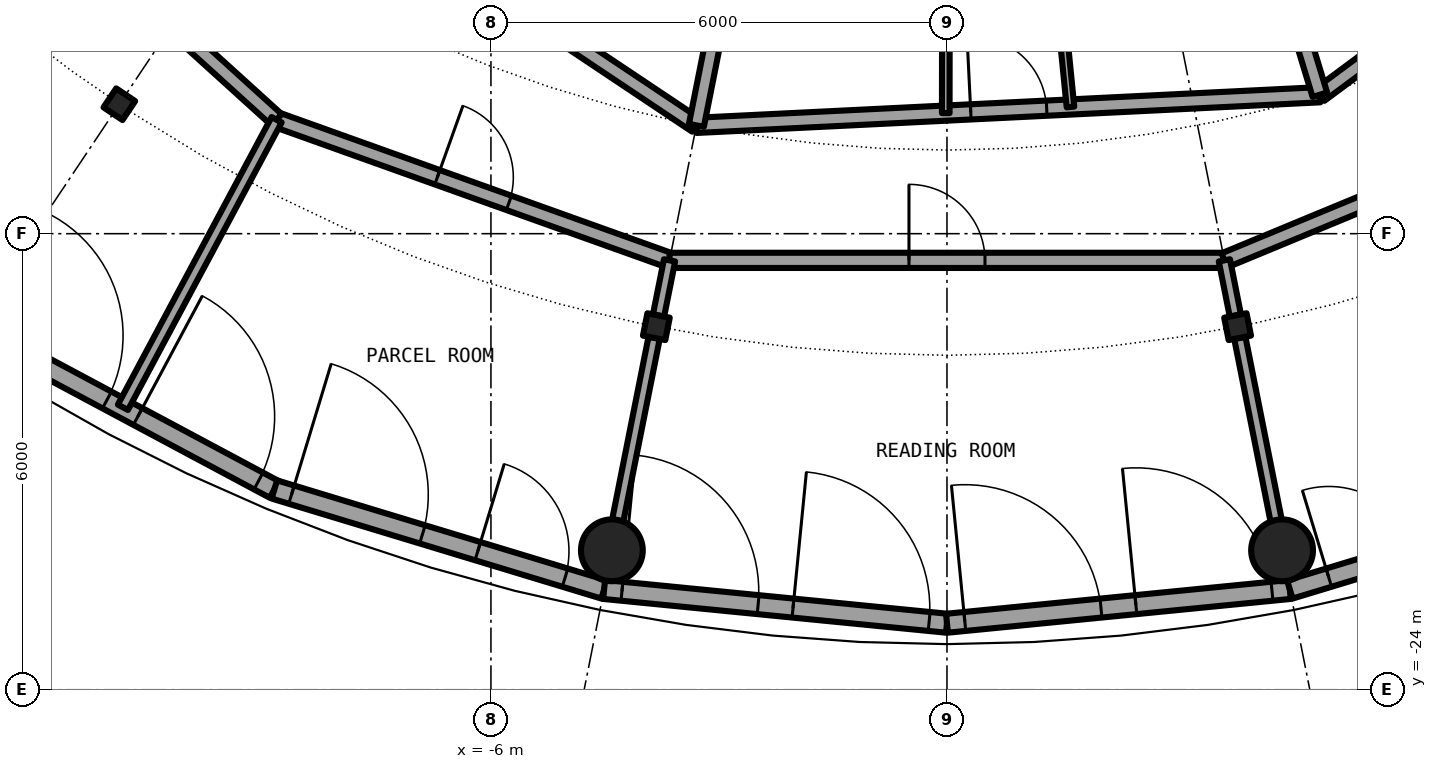
"""IFC4 building model, lengths in metres.
Left out: names, types, materials, properties, quantities, classifications, styles, units other than length and angle.
Written with IfcOpenShell. Run it as: python <this file> out.ifc"""

import sys

from ifc_helpers import new_model, si_unit, direction, frame, frame_2d, origin, origin_2d, place, context, subcontext, project, spatial, rectangle, hollow_circle, i_section, extrude, element, fill, save


model = new_model("IFC4")
c1 = context("Model", 3, precision=1e-05, world=origin(), true_north=direction((0.0, 1.0)))
c2 = subcontext(c1, "Body", "Model", "MODEL_VIEW")
j1 = project(units=[si_unit("LENGTHUNIT", "METRE"), si_unit("PLANEANGLEUNIT", "RADIAN")], contexts=[c1])
p1 = place(None, origin())
s1 = spatial("IfcSite", under=j1, at=p1, CompositionType="ELEMENT")
p2 = place(p1, origin())
s2 = spatial("IfcBuilding", under=s1, at=p2, CompositionType="ELEMENT")
p3 = place(p2, frame((0.0, 0.0, 249.3)))
s3 = spatial("IfcBuildingStorey", under=s2, at=p3, CompositionType="ELEMENT", Elevation=249.3)
for number, where, z_axis, x_axis in (
    (1, (-4.409, -22.166, 0.0), (0.0, 0.0, 1.0), (1.0, 0.0, 0.0)),
    (2, (4.409, -22.166, 0.0), (0.0, 0.0, 1.0), (1.0, 0.0, 0.0)),
):
    element("IfcColumn", number, at=place(p3, frame(where, z_axis=z_axis, x_axis=x_axis)), inside=s3, PredefinedType="COLUMN", context=c2, shape_type="SweptSolid", body=[
        extrude(hollow_circle(Radius=0.406, WallThickness=0.03, at=origin_2d()), origin(), (0.0, 0.0, 1.0), 3.05),
    ])
for number, where, z_axis, x_axis in (
    (3, (-10.889, -16.297, 0.0), (0.0, 0.0, 1.0), (-0.556, -0.831, 0.0)),
    (4, (-3.824, -19.223, 0.0), (0.0, 0.0, 1.0), (-0.195, -0.981, 0.0)),
    (5, (3.824, -19.223, 0.0), (0.0, 0.0, 1.0), (0.195, -0.981, 0.0)),
):
    element("IfcColumn", number, at=place(p3, frame(where, z_axis=z_axis, x_axis=x_axis)), inside=s3, PredefinedType="COLUMN", context=c2, shape_type="SweptSolid", body=[
        extrude(i_section(OverallWidth=0.3, OverallDepth=0.3, WebThickness=0.011, FlangeThickness=0.019, FilletRadius=0.027, at=origin_2d()), origin(), (0.0, 0.0, 1.0), 3.05),
    ])
p4 = place(p3, frame((-12.848, -19.228, 0.0), z_axis=(0.0, 0.0, 1.0), x_axis=(0.881912752543, -0.471412660947, 0.0)))
e6 = element("IfcWall", 6, at=p4, inside=s3, PredefinedType="SOLIDWALL", context=c2, shape_type="SweptSolid", body=[
    extrude(rectangle(XDim=4.533, YDim=0.25, at=frame_2d((2.267, 0.0))), origin(), (0.0, 0.0, 1.0), 2.7),
])
p5 = place(p4, frame((0.236, 0.0, 0.0)))
e7 = element("IfcOpeningElement", 7, at=p5, cuts=e6, PredefinedType="OPENING", context=c2, shape_type="SweptSolid", body=[
    extrude(rectangle(XDim=1.8, YDim=2.2, at=frame_2d((0.9, 1.1))), frame((0.0, 0.135, 0.0), z_axis=(0.0, -1.0, 0.0), x_axis=(1.0, 0.0, 0.0)), (0.0, 0.0, 1.0), 0.27),
])
p6 = place(p4, frame((2.497, 0.0, 0.0)))
e8 = element("IfcOpeningElement", 8, at=p6, cuts=e6, PredefinedType="OPENING", context=c2, shape_type="SweptSolid", body=[
    extrude(rectangle(XDim=1.8, YDim=2.2, at=frame_2d((0.9, 1.1))), frame((0.0, 0.135, 0.0), z_axis=(0.0, -1.0, 0.0), x_axis=(1.0, 0.0, 0.0)), (0.0, 0.0, 1.0), 0.27),
])
p7 = place(p3, frame((-8.85, -21.365, 0.0), z_axis=(0.0, 0.0, 1.0), x_axis=(0.956960982965, -0.290216603735, 0.0)))
e9 = element("IfcWall", 9, at=p7, inside=s3, PredefinedType="SOLIDWALL", context=c2, shape_type="SweptSolid", body=[
    extrude(rectangle(XDim=4.534, YDim=0.25, at=frame_2d((2.267, 0.0))), origin(), (0.0, 0.0, 1.0), 2.7),
])
p8 = place(p7, frame((0.236, 0.0, 0.0)))
e10 = element("IfcOpeningElement", 10, at=p8, cuts=e9, PredefinedType="OPENING", context=c2, shape_type="SweptSolid", body=[
    extrude(rectangle(XDim=1.8, YDim=2.2, at=frame_2d((0.9, 1.1))), frame((0.0, 0.135, 0.0), z_axis=(0.0, -1.0, 0.0), x_axis=(1.0, 0.0, 0.0)), (0.0, 0.0, 1.0), 0.27),
])
p9 = place(p7, frame((2.797, 0.0, 0.0)))
e11 = element("IfcOpeningElement", 11, at=p9, cuts=e9, PredefinedType="OPENING", context=c2, shape_type="SweptSolid", body=[
    extrude(rectangle(XDim=1.2, YDim=2.2, at=frame_2d((0.6, 1.1))), frame((0.0, 0.135, 0.0), z_axis=(0.0, -1.0, 0.0), x_axis=(1.0, 0.0, 0.0)), (0.0, 0.0, 1.0), 0.27),
])
p10 = place(p3, frame((-4.511, -22.681, 0.0), z_axis=(0.0, 0.0, 1.0), x_axis=(0.995189063612, -0.097973096645, 0.0)))
e12 = element("IfcWall", 12, at=p10, inside=s3, PredefinedType="SOLIDWALL", context=c2, shape_type="SweptSolid", body=[
    extrude(rectangle(XDim=4.533, YDim=0.25, at=frame_2d((2.266, 0.0))), origin(), (0.0, 0.0, 1.0), 2.7),
])
p11 = place(p10, frame((0.236, 0.0, 0.0)))
e13 = element("IfcOpeningElement", 13, at=p11, cuts=e12, PredefinedType="OPENING", context=c2, shape_type="SweptSolid", body=[
    extrude(rectangle(XDim=1.8, YDim=2.2, at=frame_2d((0.9, 1.1))), frame((0.0, 0.135, 0.0), z_axis=(0.0, -1.0, 0.0), x_axis=(1.0, 0.0, 0.0)), (0.0, 0.0, 1.0), 0.27),
])
p12 = place(p10, frame((2.497, 0.0, 0.0)))
e14 = element("IfcOpeningElement", 14, at=p12, cuts=e12, PredefinedType="OPENING", context=c2, shape_type="SweptSolid", body=[
    extrude(rectangle(XDim=1.8, YDim=2.2, at=frame_2d((0.9, 1.1))), frame((0.0, 0.135, 0.0), z_axis=(0.0, -1.0, 0.0), x_axis=(1.0, 0.0, 0.0)), (0.0, 0.0, 1.0), 0.27),
])
p13 = place(p3, frame((0.0, -23.125, 0.0), z_axis=(0.0, 0.0, 1.0), x_axis=(0.995189063612, 0.097973096645, 0.0)))
e15 = element("IfcWall", 15, at=p13, inside=s3, PredefinedType="SOLIDWALL", context=c2, shape_type="SweptSolid", body=[
    extrude(rectangle(XDim=4.533, YDim=0.25, at=frame_2d((2.266, 0.0))), origin(), (0.0, 0.0, 1.0), 2.7),
])
p14 = place(p13, frame((0.236, 0.0, 0.0)))
e16 = element("IfcOpeningElement", 16, at=p14, cuts=e15, PredefinedType="OPENING", context=c2, shape_type="SweptSolid", body=[
    extrude(rectangle(XDim=1.8, YDim=2.2, at=frame_2d((0.9, 1.1))), frame((0.0, 0.135, 0.0), z_axis=(0.0, -1.0, 0.0), x_axis=(1.0, 0.0, 0.0)), (0.0, 0.0, 1.0), 0.27),
])
p15 = place(p13, frame((2.497, 0.0, 0.0)))
e17 = element("IfcOpeningElement", 17, at=p15, cuts=e15, PredefinedType="OPENING", context=c2, shape_type="SweptSolid", body=[
    extrude(rectangle(XDim=1.8, YDim=2.2, at=frame_2d((0.9, 1.1))), frame((0.0, 0.135, 0.0), z_axis=(0.0, -1.0, 0.0), x_axis=(1.0, 0.0, 0.0)), (0.0, 0.0, 1.0), 0.27),
])
p16 = place(p3, frame((4.511, -22.681, 0.0), z_axis=(0.0, 0.0, 1.0), x_axis=(0.956960982965, 0.290216603735, 0.0)))
e18 = element("IfcWall", 18, at=p16, inside=s3, PredefinedType="SOLIDWALL", context=c2, shape_type="SweptSolid", body=[
    extrude(rectangle(XDim=4.534, YDim=0.25, at=frame_2d((2.267, 0.0))), origin(), (0.0, 0.0, 1.0), 2.7),
])
p17 = place(p16, frame((0.536, 0.0, 0.0)))
e19 = element("IfcOpeningElement", 19, at=p17, cuts=e18, PredefinedType="OPENING", context=c2, shape_type="SweptSolid", body=[
    extrude(rectangle(XDim=1.2, YDim=2.2, at=frame_2d((0.6, 1.1))), frame((0.0, 0.135, 0.0), z_axis=(0.0, -1.0, 0.0), x_axis=(1.0, 0.0, 0.0)), (0.0, 0.0, 1.0), 0.27),
])
p18 = place(p16, frame((2.497, 0.0, 0.0)))
e20 = element("IfcOpeningElement", 20, at=p18, cuts=e18, PredefinedType="OPENING", context=c2, shape_type="SweptSolid", body=[
    extrude(rectangle(XDim=1.8, YDim=2.2, at=frame_2d((0.9, 1.1))), frame((0.0, 0.135, 0.0), z_axis=(0.0, -1.0, 0.0), x_axis=(1.0, 0.0, 0.0)), (0.0, 0.0, 1.0), 0.27),
])
p19 = place(p3, frame((-8.82, -16.501, 0.0), z_axis=(0.0, 0.0, 1.0), x_axis=(0.941533512578, -0.336919344492, 0.0)))
e21 = element("IfcWall", 21, at=p19, inside=s3, PredefinedType="PARTITIONING", context=c2, shape_type="SweptSolid", body=[
    extrude(rectangle(XDim=5.491, YDim=0.2, at=frame_2d((2.746, 0.0))), origin(), (0.0, 0.0, 1.0), 2.7),
])
p20 = place(p19, frame((2.246, 0.0, 0.0)))
e22 = element("IfcOpeningElement", 22, at=p20, cuts=e21, PredefinedType="OPENING", context=c2, shape_type="SweptSolid", body=[
    extrude(rectangle(XDim=1.0, YDim=2.3, at=frame_2d((0.5, 1.15))), frame((0.0, 0.11, 0.0), z_axis=(0.0, -1.0, 0.0), x_axis=(1.0, 0.0, 0.0)), (0.0, 0.0, 1.0), 0.22),
])
p21 = place(p3, frame((-3.65, -18.351, 0.0), z_axis=(0.0, 0.0, 1.0), x_axis=(1.0, 0.0, 0.0)))
e23 = element("IfcWall", 23, at=p21, inside=s3, PredefinedType="PARTITIONING", context=c2, shape_type="SweptSolid", body=[
    extrude(rectangle(XDim=7.3, YDim=0.2, at=frame_2d((3.65, 0.0))), origin(), (0.0, 0.0, 1.0), 2.7),
])
p22 = place(p21, frame((3.15, 0.0, 0.0)))
e24 = element("IfcOpeningElement", 24, at=p22, cuts=e23, PredefinedType="OPENING", context=c2, shape_type="SweptSolid", body=[
    extrude(rectangle(XDim=1.0, YDim=2.3, at=frame_2d((0.5, 1.15))), frame((0.0, 0.11, 0.0), z_axis=(0.0, -1.0, 0.0), x_axis=(1.0, 0.0, 0.0)), (0.0, 0.0, 1.0), 0.22),
])
p23 = place(p3, frame((3.65, -18.351, 0.0), z_axis=(0.0, 0.0, 1.0), x_axis=(0.923866436038, 0.382715048518, 0.0)))
e25 = element("IfcWall", 25, at=p23, inside=s3, PredefinedType="PARTITIONING", context=c2, shape_type="SweptSolid", body=[
    extrude(rectangle(XDim=7.301, YDim=0.2, at=frame_2d((3.65, 0.0))), origin(), (0.0, 0.0, 1.0), 2.7),
])
p24 = place(p23, frame((3.15, 0.0, 0.0)))
e26 = element("IfcOpeningElement", 26, at=p24, cuts=e25, PredefinedType="OPENING", context=c2, shape_type="SweptSolid", body=[
    extrude(rectangle(XDim=1.0, YDim=2.3, at=frame_2d((0.5, 1.15))), frame((0.0, 0.11, 0.0), z_axis=(0.0, -1.0, 0.0), x_axis=(1.0, 0.0, 0.0)), (0.0, 0.0, 1.0), 0.22),
])
p25 = place(p3, frame((-15.557, -10.395, 0.0), z_axis=(0.0, 0.0, 1.0), x_axis=(0.740947701955, -0.671562731967, 0.0)))
e27 = element("IfcWall", 27, at=p25, inside=s3, PredefinedType="PARTITIONING", context=c2, shape_type="SweptSolid", body=[
    extrude(rectangle(XDim=9.092, YDim=0.2, at=frame_2d((4.546, 0.0))), origin(), (0.0, 0.0, 1.0), 2.7),
])
p26 = place(p25, frame((4.046, 0.0, 0.0)))
e28 = element("IfcOpeningElement", 28, at=p26, cuts=e27, PredefinedType="OPENING", context=c2, shape_type="SweptSolid", body=[
    extrude(rectangle(XDim=1.0, YDim=2.3, at=frame_2d((0.5, 1.15))), frame((0.0, 0.11, 0.0), z_axis=(0.0, -1.0, 0.0), x_axis=(1.0, 0.0, 0.0)), (0.0, 0.0, 1.0), 0.22),
])
p27 = place(p3, frame((-3.297, -16.575, 0.0), z_axis=(0.0, 0.0, 1.0), x_axis=(0.998796706656, 0.0490422142, 0.0)))
e29 = element("IfcWall", 29, at=p27, inside=s3, PredefinedType="PARTITIONING", context=c2, shape_type="SweptSolid", body=[
    extrude(rectangle(XDim=8.214, YDim=0.2, at=frame_2d((4.107, 0.0))), origin(), (0.0, 0.0, 1.0), 2.7),
])
p28 = place(p27, frame((3.614, 0.0, 0.0)))
e30 = element("IfcOpeningElement", 30, at=p28, cuts=e29, PredefinedType="OPENING", context=c2, shape_type="SweptSolid", body=[
    extrude(rectangle(XDim=1.0, YDim=2.3, at=frame_2d((0.5, 1.15))), frame((0.0, 0.11, 0.0), z_axis=(0.0, -1.0, 0.0), x_axis=(1.0, 0.0, 0.0)), (0.0, 0.0, 1.0), 0.22),
])
p29 = place(p3, frame((4.906, -16.172, 0.0), z_axis=(0.0, 0.0, 1.0), x_axis=(0.803204584823, 0.59570327758, 0.0)))
e31 = element("IfcWall", 31, at=p29, inside=s3, PredefinedType="PARTITIONING", context=c2, shape_type="SweptSolid", body=[
    extrude(rectangle(XDim=11.387, YDim=0.2, at=frame_2d((5.693, 0.0))), origin(), (0.0, 0.0, 1.0), 2.7),
])
p30 = place(p29, frame((4.38, 0.0, 0.0)))
e32 = element("IfcOpeningElement", 32, at=p30, cuts=e31, PredefinedType="OPENING", context=c2, shape_type="SweptSolid", body=[
    extrude(rectangle(XDim=1.0, YDim=2.3, at=frame_2d((0.5, 1.15))), frame((0.0, 0.11, 0.0), z_axis=(0.0, -1.0, 0.0), x_axis=(1.0, 0.0, 0.0)), (0.0, 0.0, 1.0), 0.22),
])
p31 = place(p3, frame((-14.052, -9.392, 0.0), z_axis=(0.0, 0.0, 1.0), x_axis=(0.831588235223, -0.555392660231, 0.0)))
e33 = element("IfcWall", 33, at=p31, inside=s3, PredefinedType="PARTITIONING", context=c2, shape_type="SweptSolid", body=[
    extrude(rectangle(XDim=12.933, YDim=0.2, at=frame_2d((6.466, 0.0))), origin(), (0.0, 0.0, 1.0), 2.7),
])
p32 = place(p31, frame((7.585, 0.0, 0.0)))
e34 = element("IfcOpeningElement", 34, at=p32, cuts=e33, PredefinedType="OPENING", context=c2, shape_type="SweptSolid", body=[
    extrude(rectangle(XDim=1.0, YDim=2.3, at=frame_2d((0.5, 1.15))), frame((0.0, 0.11, 0.0), z_axis=(0.0, -1.0, 0.0), x_axis=(1.0, 0.0, 0.0)), (0.0, 0.0, 1.0), 0.22),
])
p33 = place(p3, frame((-10.842, -20.284, 0.0), z_axis=(0.0, 0.0, 1.0), x_axis=(0.471385667229, 0.881927181082, 0.0)))
e35 = element("IfcWall", 35, at=p33, inside=s3, PredefinedType="PARTITIONING", context=c2, shape_type="SweptSolid", body=[
    extrude(rectangle(XDim=4.289, YDim=0.15, at=frame_2d((2.145, 0.0))), origin(), (0.0, 0.0, 1.0), 2.7),
])
p34 = place(p3, frame((-4.332, -21.775, 0.0), z_axis=(0.0, 0.0, 1.0), x_axis=(0.195350176405, 0.980733556364, 0.0)))
e36 = element("IfcWall", 36, at=p34, inside=s3, PredefinedType="PARTITIONING", context=c2, shape_type="SweptSolid", body=[
    extrude(rectangle(XDim=2.452, YDim=0.15, at=frame_2d((1.226, 0.0))), origin(), (0.0, 0.0, 1.0), 2.7),
])
p35 = place(p3, frame((-3.795, -19.076, 0.0), z_axis=(0.0, 0.0, 1.0), x_axis=(0.196179647951, 0.980567970989, 0.0)))
e37 = element("IfcWall", 37, at=p35, inside=s3, PredefinedType="PARTITIONING", context=c2, shape_type="SweptSolid", body=[
    extrude(rectangle(XDim=0.739, YDim=0.15, at=frame_2d((0.37, 0.0))), origin(), (0.0, 0.0, 1.0), 2.7),
])
p36 = place(p3, frame((-3.297, -16.575, 0.0), z_axis=(0.0, 0.0, 1.0), x_axis=(0.19524145691, 0.980755205698, 0.0)))
e38 = element("IfcWall", 38, at=p36, inside=s3, PredefinedType="PARTITIONING", context=c2, shape_type="SweptSolid", body=[
    extrude(rectangle(XDim=9.18, YDim=0.2, at=frame_2d((4.59, 0.0))), origin(), (0.0, 0.0, 1.0), 2.7),
])
p37 = place(p3, frame((-0.016, -16.414, 0.0), z_axis=(0.0, 0.0, 1.0), x_axis=(0.001210427419, 0.999999267432, 0.0)))
e39 = element("IfcWall", 39, at=p37, inside=s3, PredefinedType="PARTITIONING", context=c2, shape_type="SweptSolid", body=[
    extrude(rectangle(XDim=2.622, YDim=0.1, at=frame_2d((1.311, 0.0))), origin(), (0.0, 0.0, 1.0), 2.7),
])
p38 = place(p3, frame((1.365, -13.724, 0.0), z_axis=(0.0, 0.0, 1.0), x_axis=(0.099171803948, -0.995070325807, 0.0)))
e40 = element("IfcWall", 40, at=p38, inside=s3, PredefinedType="PARTITIONING", context=c2, shape_type="SweptSolid", body=[
    extrude(rectangle(XDim=2.622, YDim=0.1, at=frame_2d((1.311, 0.0))), origin(), (0.0, 0.0, 1.0), 2.7),
])
p39 = place(p3, frame((2.24, -7.388, 0.0), z_axis=(0.0, 0.0, 1.0), x_axis=(0.290420725025, -0.956899055531, 0.0)))
e41 = element("IfcWall", 41, at=p39, inside=s3, PredefinedType="PARTITIONING", context=c2, shape_type="SweptSolid", body=[
    extrude(rectangle(XDim=9.18, YDim=0.2, at=frame_2d((4.59, 0.0))), origin(), (0.0, 0.0, 1.0), 2.7),
])
p40 = place(p3, frame((3.65, -18.351, 0.0), z_axis=(0.0, 0.0, 1.0), x_axis=(0.194908923467, -0.98082134538, 0.0)))
e42 = element("IfcWall", 42, at=p40, inside=s3, PredefinedType="PARTITIONING", context=c2, shape_type="SweptSolid", body=[
    extrude(rectangle(XDim=0.739, YDim=0.15, at=frame_2d((0.37, 0.0))), origin(), (0.0, 0.0, 1.0), 2.7),
])
p41 = place(p3, frame((3.853, -19.371, 0.0), z_axis=(0.0, 0.0, 1.0), x_axis=(0.195043256877, -0.980794641068, 0.0)))
e43 = element("IfcWall", 43, at=p41, inside=s3, PredefinedType="PARTITIONING", context=c2, shape_type="SweptSolid", body=[
    extrude(rectangle(XDim=2.451, YDim=0.15, at=frame_2d((1.226, 0.0))), origin(), (0.0, 0.0, 1.0), 2.7),
])
p42 = place(p5, origin())
e44 = element("IfcDoor", 44, at=p42, inside=s3, OperationType="SINGLE_SWING_LEFT", PredefinedType="DOOR", context=c2, shape_type="SweptSolid", body=[
    extrude(rectangle(XDim=1.8, YDim=2.2, at=frame_2d((0.9, 1.1))), frame((0.0, 0.025, 0.0), z_axis=(0.0, -1.0, 0.0), x_axis=(1.0, 0.0, 0.0)), (0.0, 0.0, 1.0), 0.05),
])
fill(e7, e44)
p43 = place(p6, origin())
e45 = element("IfcDoor", 45, at=p43, inside=s3, OperationType="SINGLE_SWING_LEFT", PredefinedType="DOOR", context=c2, shape_type="SweptSolid", body=[
    extrude(rectangle(XDim=1.8, YDim=2.2, at=frame_2d((0.9, 1.1))), frame((0.0, 0.025, 0.0), z_axis=(0.0, -1.0, 0.0), x_axis=(1.0, 0.0, 0.0)), (0.0, 0.0, 1.0), 0.05),
])
fill(e8, e45)
p44 = place(p8, origin())
e46 = element("IfcDoor", 46, at=p44, inside=s3, OperationType="SINGLE_SWING_LEFT", PredefinedType="DOOR", context=c2, shape_type="SweptSolid", body=[
    extrude(rectangle(XDim=1.8, YDim=2.2, at=frame_2d((0.9, 1.1))), frame((0.0, 0.025, 0.0), z_axis=(0.0, -1.0, 0.0), x_axis=(1.0, 0.0, 0.0)), (0.0, 0.0, 1.0), 0.05),
])
fill(e10, e46)
p45 = place(p9, origin())
e47 = element("IfcDoor", 47, at=p45, inside=s3, OperationType="SINGLE_SWING_LEFT", PredefinedType="DOOR", context=c2, shape_type="SweptSolid", body=[
    extrude(rectangle(XDim=1.2, YDim=2.2, at=frame_2d((0.6, 1.1))), frame((0.0, 0.025, 0.0), z_axis=(0.0, -1.0, 0.0), x_axis=(1.0, 0.0, 0.0)), (0.0, 0.0, 1.0), 0.05),
])
fill(e11, e47)
p46 = place(p11, origin())
e48 = element("IfcDoor", 48, at=p46, inside=s3, OperationType="SINGLE_SWING_LEFT", PredefinedType="DOOR", context=c2, shape_type="SweptSolid", body=[
    extrude(rectangle(XDim=1.8, YDim=2.2, at=frame_2d((0.9, 1.1))), frame((0.0, 0.025, 0.0), z_axis=(0.0, -1.0, 0.0), x_axis=(1.0, 0.0, 0.0)), (0.0, 0.0, 1.0), 0.05),
])
fill(e13, e48)
p47 = place(p12, origin())
e49 = element("IfcDoor", 49, at=p47, inside=s3, OperationType="SINGLE_SWING_LEFT", PredefinedType="DOOR", context=c2, shape_type="SweptSolid", body=[
    extrude(rectangle(XDim=1.8, YDim=2.2, at=frame_2d((0.9, 1.1))), frame((0.0, 0.025, 0.0), z_axis=(0.0, -1.0, 0.0), x_axis=(1.0, 0.0, 0.0)), (0.0, 0.0, 1.0), 0.05),
])
fill(e14, e49)
p48 = place(p14, origin())
e50 = element("IfcDoor", 50, at=p48, inside=s3, OperationType="SINGLE_SWING_LEFT", PredefinedType="DOOR", context=c2, shape_type="SweptSolid", body=[
    extrude(rectangle(XDim=1.8, YDim=2.2, at=frame_2d((0.9, 1.1))), frame((0.0, 0.025, 0.0), z_axis=(0.0, -1.0, 0.0), x_axis=(1.0, 0.0, 0.0)), (0.0, 0.0, 1.0), 0.05),
])
fill(e16, e50)
p49 = place(p15, origin())
e51 = element("IfcDoor", 51, at=p49, inside=s3, OperationType="SINGLE_SWING_LEFT", PredefinedType="DOOR", context=c2, shape_type="SweptSolid", body=[
    extrude(rectangle(XDim=1.8, YDim=2.2, at=frame_2d((0.9, 1.1))), frame((0.0, 0.025, 0.0), z_axis=(0.0, -1.0, 0.0), x_axis=(1.0, 0.0, 0.0)), (0.0, 0.0, 1.0), 0.05),
])
fill(e17, e51)
p50 = place(p17, origin())
e52 = element("IfcDoor", 52, at=p50, inside=s3, OperationType="SINGLE_SWING_LEFT", PredefinedType="DOOR", context=c2, shape_type="SweptSolid", body=[
    extrude(rectangle(XDim=1.2, YDim=2.2, at=frame_2d((0.6, 1.1))), frame((0.0, 0.025, 0.0), z_axis=(0.0, -1.0, 0.0), x_axis=(1.0, 0.0, 0.0)), (0.0, 0.0, 1.0), 0.05),
])
fill(e19, e52)
p51 = place(p20, origin())
e53 = element("IfcDoor", 53, at=p51, inside=s3, OperationType="SINGLE_SWING_RIGHT", PredefinedType="DOOR", context=c2, shape_type="SweptSolid", body=[
    extrude(rectangle(XDim=1.0, YDim=2.3, at=frame_2d((0.5, 1.15))), frame((0.0, 0.025, 0.0), z_axis=(0.0, -1.0, 0.0), x_axis=(1.0, 0.0, 0.0)), (0.0, 0.0, 1.0), 0.05),
])
fill(e22, e53)
p52 = place(p22, origin())
e54 = element("IfcDoor", 54, at=p52, inside=s3, OperationType="SINGLE_SWING_LEFT", PredefinedType="DOOR", context=c2, shape_type="SweptSolid", body=[
    extrude(rectangle(XDim=1.0, YDim=2.3, at=frame_2d((0.5, 1.15))), frame((0.0, 0.025, 0.0), z_axis=(0.0, -1.0, 0.0), x_axis=(1.0, 0.0, 0.0)), (0.0, 0.0, 1.0), 0.05),
])
fill(e24, e54)
p53 = place(p28, origin())
e55 = element("IfcDoor", 55, at=p53, inside=s3, OperationType="SINGLE_SWING_RIGHT", PredefinedType="DOOR", context=c2, shape_type="SweptSolid", body=[
    extrude(rectangle(XDim=1.0, YDim=2.3, at=frame_2d((0.5, 1.15))), frame((0.0, 0.025, 0.0), z_axis=(0.0, -1.0, 0.0), x_axis=(1.0, 0.0, 0.0)), (0.0, 0.0, 1.0), 0.05),
])
fill(e30, e55)
save(model, sys.argv[1])
